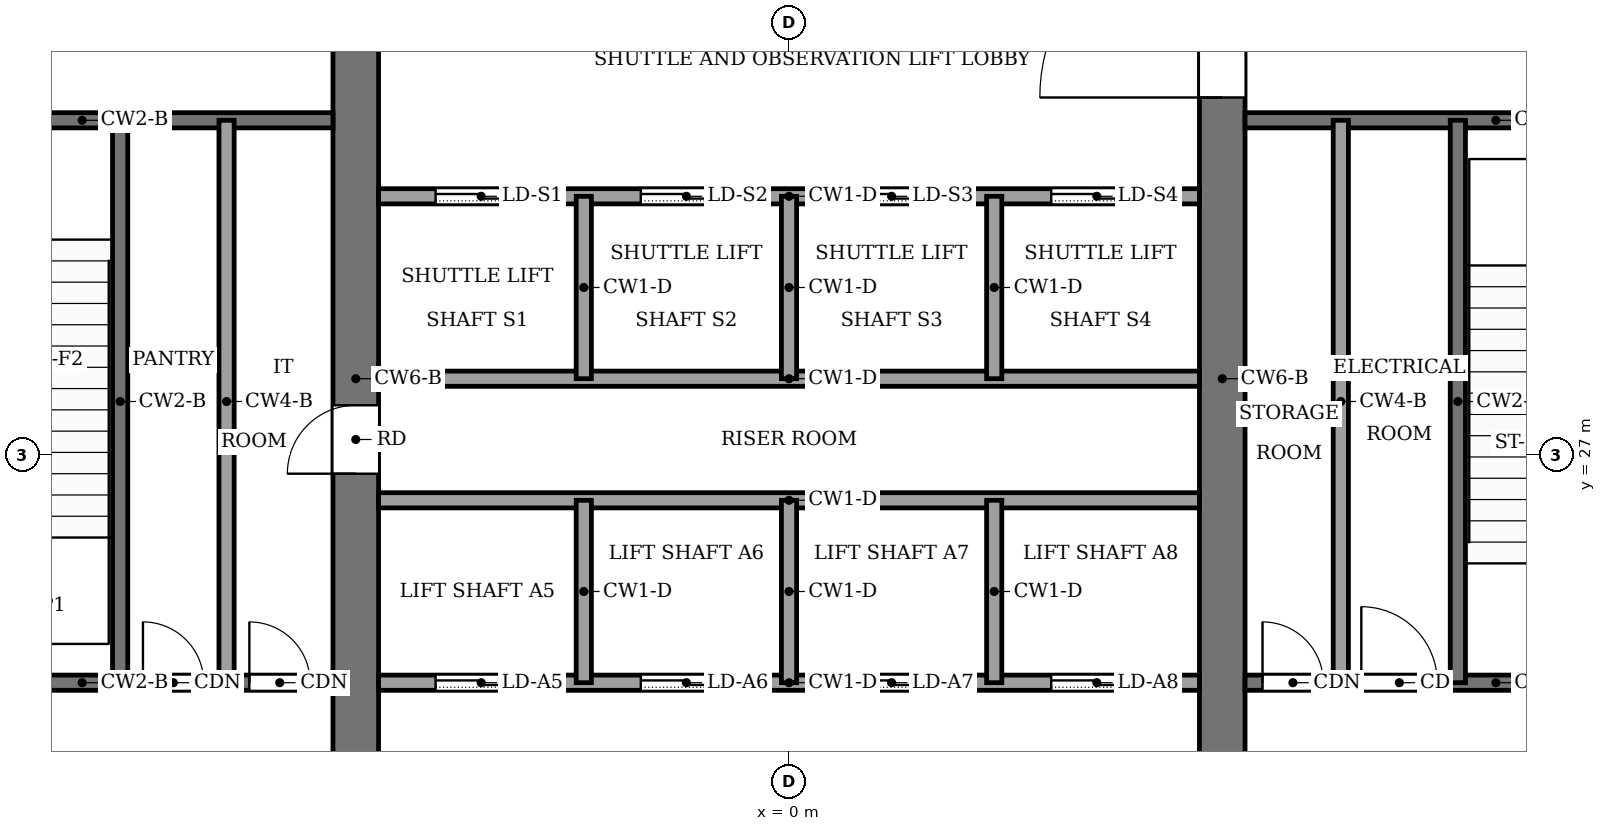
"""IFC4 building model, lengths in metres.
Left out: names, types, materials, properties, quantities, classifications, styles, units other than length and angle.
Written with IfcOpenShell. Run it as: python <this file> out.ifc"""

import sys

from ifc_helpers import new_model, si_unit, direction, frame, frame_2d, origin, place, context, subcontext, project, spatial, rectangle, extrude, element, fill, save


model = new_model("IFC4")
c1 = context("Model", 3, precision=1e-05, world=origin(), true_north=direction((0.0, 1.0)))
c2 = subcontext(c1, "Body", "Model", "MODEL_VIEW")
j1 = project(units=[si_unit("LENGTHUNIT", "METRE"), si_unit("PLANEANGLEUNIT", "RADIAN")], contexts=[c1])
p1 = place(None, origin())
s1 = spatial("IfcSite", under=j1, at=p1, CompositionType="ELEMENT")
p2 = place(p1, origin())
s2 = spatial("IfcBuilding", under=s1, at=p2, CompositionType="ELEMENT")
p3 = place(p2, frame((0.0, 0.0, 177.0)))
s3 = spatial("IfcBuildingStorey", under=s2, at=p3, CompositionType="ELEMENT", Elevation=177.0)
p4 = place(p3, frame((-5.7, 18.4, -0.13), z_axis=(0.0, 0.0, 1.0), x_axis=(0.0, 1.0, 0.0)))
e1 = element("IfcWall", 1, at=p4, inside=s3, PredefinedType="SHEAR", context=c2, shape_type="SweptSolid", body=[
    extrude(rectangle(XDim=19.2, YDim=0.6, at=frame_2d((9.6, 0.0))), origin(), (0.0, 0.0, 1.0), 5.0),
])
p5 = place(p4, frame((8.35, 0.0, 0.13)))
e2 = element("IfcOpeningElement", 2, at=p5, cuts=e1, PredefinedType="OPENING", context=c2, shape_type="SweptSolid", body=[
    extrude(rectangle(XDim=0.9, YDim=2.1, at=frame_2d((0.45, 1.05))), frame((0.0, 0.31, 0.0), z_axis=(0.0, -1.0, 0.0), x_axis=(1.0, 0.0, 0.0)), (0.0, 0.0, 1.0), 0.62),
])
p6 = place(p3, frame((5.7, 18.4, -0.13), z_axis=(0.0, 0.0, 1.0), x_axis=(0.0, 1.0, 0.0)))
e3 = element("IfcWall", 3, at=p6, inside=s3, PredefinedType="SHEAR", context=c2, shape_type="SweptSolid", body=[
    extrude(rectangle(XDim=19.2, YDim=0.6, at=frame_2d((9.6, 0.0))), origin(), (0.0, 0.0, 1.0), 5.0),
])
p7 = place(p6, frame((13.3, 0.0, 0.13)))
e4 = element("IfcOpeningElement", 4, at=p7, cuts=e3, PredefinedType="OPENING", context=c2, shape_type="SweptSolid", body=[
    extrude(rectangle(XDim=2.4, YDim=2.4, at=frame_2d((1.2, 1.2))), frame((0.0, 0.31, 0.0), z_axis=(0.0, -1.0, 0.0), x_axis=(1.0, 0.0, 0.0)), (0.0, 0.0, 1.0), 0.62),
])
p8 = place(p3, frame((-12.6, 24.0, 0.0), z_axis=(0.0, 0.0, 1.0), x_axis=(1.0, 0.0, 0.0)))
e5 = element("IfcWall", 5, at=p8, inside=s3, PredefinedType="PARTITIONING", context=c2, shape_type="SweptSolid", body=[
    extrude(rectangle(XDim=6.6, YDim=0.2, at=frame_2d((3.3, 0.0))), origin(), (0.0, 0.0, 1.0), 4.87),
])
p9 = place(p8, frame((4.1, 0.0, 0.0)))
e6 = element("IfcOpeningElement", 6, at=p9, cuts=e5, PredefinedType="OPENING", context=c2, shape_type="SweptSolid", body=[
    extrude(rectangle(XDim=0.8, YDim=2.1, at=frame_2d((0.4, 1.05))), frame((0.0, 0.11, 0.0), z_axis=(0.0, -1.0, 0.0), x_axis=(1.0, 0.0, 0.0)), (0.0, 0.0, 1.0), 0.22),
])
p10 = place(p8, frame((5.5, 0.0, 0.0)))
e7 = element("IfcOpeningElement", 7, at=p10, cuts=e5, PredefinedType="OPENING", context=c2, shape_type="SweptSolid", body=[
    extrude(rectangle(XDim=0.8, YDim=2.1, at=frame_2d((0.4, 1.05))), frame((0.0, 0.11, 0.0), z_axis=(0.0, -1.0, 0.0), x_axis=(1.0, 0.0, 0.0)), (0.0, 0.0, 1.0), 0.22),
])
p11 = place(p3, frame((-5.4, 24.0, 0.0), z_axis=(0.0, 0.0, 1.0), x_axis=(1.0, 0.0, 0.0)))
e8 = element("IfcWall", 8, at=p11, inside=s3, PredefinedType="PARTITIONING", context=c2, shape_type="SweptSolid", body=[
    extrude(rectangle(XDim=10.8, YDim=0.2, at=frame_2d((5.4, 0.0))), origin(), (0.0, 0.0, 1.0), 4.87),
])
p12 = place(p11, frame((0.75, 0.0, 0.0)))
e9 = element("IfcOpeningElement", 9, at=p12, cuts=e8, PredefinedType="OPENING", context=c2, shape_type="SweptSolid", body=[
    extrude(rectangle(XDim=1.2, YDim=2.2, at=frame_2d((0.6, 1.1))), frame((0.0, 0.11, 0.0), z_axis=(0.0, -1.0, 0.0), x_axis=(1.0, 0.0, 0.0)), (0.0, 0.0, 1.0), 0.22),
])
p13 = place(p11, frame((3.45, 0.0, 0.0)))
e10 = element("IfcOpeningElement", 10, at=p13, cuts=e8, PredefinedType="OPENING", context=c2, shape_type="SweptSolid", body=[
    extrude(rectangle(XDim=1.2, YDim=2.2, at=frame_2d((0.6, 1.1))), frame((0.0, 0.11, 0.0), z_axis=(0.0, -1.0, 0.0), x_axis=(1.0, 0.0, 0.0)), (0.0, 0.0, 1.0), 0.22),
])
p14 = place(p11, frame((6.15, 0.0, 0.0)))
e11 = element("IfcOpeningElement", 11, at=p14, cuts=e8, PredefinedType="OPENING", context=c2, shape_type="SweptSolid", body=[
    extrude(rectangle(XDim=1.2, YDim=2.2, at=frame_2d((0.6, 1.1))), frame((0.0, 0.11, 0.0), z_axis=(0.0, -1.0, 0.0), x_axis=(1.0, 0.0, 0.0)), (0.0, 0.0, 1.0), 0.22),
])
p15 = place(p11, frame((8.85, 0.0, 0.0)))
e12 = element("IfcOpeningElement", 12, at=p15, cuts=e8, PredefinedType="OPENING", context=c2, shape_type="SweptSolid", body=[
    extrude(rectangle(XDim=1.2, YDim=2.2, at=frame_2d((0.6, 1.1))), frame((0.0, 0.11, 0.0), z_axis=(0.0, -1.0, 0.0), x_axis=(1.0, 0.0, 0.0)), (0.0, 0.0, 1.0), 0.22),
])
p16 = place(p3, frame((6.0, 24.0, 0.0), z_axis=(0.0, 0.0, 1.0), x_axis=(1.0, 0.0, 0.0)))
e13 = element("IfcWall", 13, at=p16, inside=s3, PredefinedType="PARTITIONING", context=c2, shape_type="SweptSolid", body=[
    extrude(rectangle(XDim=6.6, YDim=0.2, at=frame_2d((3.3, 0.0))), origin(), (0.0, 0.0, 1.0), 4.87),
])
p17 = place(p16, frame((0.23, 0.0, 0.0)))
e14 = element("IfcOpeningElement", 14, at=p17, cuts=e13, PredefinedType="OPENING", context=c2, shape_type="SweptSolid", body=[
    extrude(rectangle(XDim=0.8, YDim=2.1, at=frame_2d((0.4, 1.05))), frame((0.0, 0.11, 0.0), z_axis=(0.0, -1.0, 0.0), x_axis=(1.0, 0.0, 0.0)), (0.0, 0.0, 1.0), 0.22),
])
p18 = place(p16, frame((1.53, 0.0, 0.0)))
e15 = element("IfcOpeningElement", 15, at=p18, cuts=e13, PredefinedType="OPENING", context=c2, shape_type="SweptSolid", body=[
    extrude(rectangle(XDim=1.0, YDim=2.1, at=frame_2d((0.5, 1.05))), frame((0.0, 0.11, 0.0), z_axis=(0.0, -1.0, 0.0), x_axis=(1.0, 0.0, 0.0)), (0.0, 0.0, 1.0), 0.22),
])
p19 = place(p16, frame((4.4, 0.0, 0.0)))
e16 = element("IfcOpeningElement", 16, at=p19, cuts=e13, PredefinedType="OPENING", context=c2, shape_type="SweptSolid", body=[
    extrude(rectangle(XDim=1.2, YDim=2.2, at=frame_2d((0.6, 1.1))), frame((0.0, 0.11, 0.0), z_axis=(0.0, -1.0, 0.0), x_axis=(1.0, 0.0, 0.0)), (0.0, 0.0, 1.0), 0.22),
])
for number, where, z_axis, x_axis in (
    (17, (-5.4, 26.4, 0.0), (0.0, 0.0, 1.0), (1.0, 0.0, 0.0)),
    (18, (-5.4, 28.0, 0.0), (0.0, 0.0, 1.0), (1.0, 0.0, 0.0)),
):
    element("IfcWall", number, at=place(p3, frame(where, z_axis=z_axis, x_axis=x_axis)), inside=s3, PredefinedType="PARTITIONING", context=c2, shape_type="SweptSolid", body=[
        extrude(rectangle(XDim=10.8, YDim=0.2, at=frame_2d((5.4, 0.0))), origin(), (0.0, 0.0, 1.0), 4.87),
    ])
p20 = place(p3, frame((-5.4, 30.4, 0.0), z_axis=(0.0, 0.0, 1.0), x_axis=(1.0, 0.0, 0.0)))
e19 = element("IfcWall", 19, at=p20, inside=s3, PredefinedType="PARTITIONING", context=c2, shape_type="SweptSolid", body=[
    extrude(rectangle(XDim=10.8, YDim=0.2, at=frame_2d((5.4, 0.0))), origin(), (0.0, 0.0, 1.0), 4.87),
])
p21 = place(p20, frame((0.75, 0.0, 0.0)))
e20 = element("IfcOpeningElement", 20, at=p21, cuts=e19, PredefinedType="OPENING", context=c2, shape_type="SweptSolid", body=[
    extrude(rectangle(XDim=1.2, YDim=2.2, at=frame_2d((0.6, 1.1))), frame((0.0, 0.11, 0.0), z_axis=(0.0, -1.0, 0.0), x_axis=(1.0, 0.0, 0.0)), (0.0, 0.0, 1.0), 0.22),
])
p22 = place(p20, frame((3.45, 0.0, 0.0)))
e21 = element("IfcOpeningElement", 21, at=p22, cuts=e19, PredefinedType="OPENING", context=c2, shape_type="SweptSolid", body=[
    extrude(rectangle(XDim=1.2, YDim=2.2, at=frame_2d((0.6, 1.1))), frame((0.0, 0.11, 0.0), z_axis=(0.0, -1.0, 0.0), x_axis=(1.0, 0.0, 0.0)), (0.0, 0.0, 1.0), 0.22),
])
p23 = place(p20, frame((6.15, 0.0, 0.0)))
e22 = element("IfcOpeningElement", 22, at=p23, cuts=e19, PredefinedType="OPENING", context=c2, shape_type="SweptSolid", body=[
    extrude(rectangle(XDim=1.2, YDim=2.2, at=frame_2d((0.6, 1.1))), frame((0.0, 0.11, 0.0), z_axis=(0.0, -1.0, 0.0), x_axis=(1.0, 0.0, 0.0)), (0.0, 0.0, 1.0), 0.22),
])
p24 = place(p20, frame((8.85, 0.0, 0.0)))
e23 = element("IfcOpeningElement", 23, at=p24, cuts=e19, PredefinedType="OPENING", context=c2, shape_type="SweptSolid", body=[
    extrude(rectangle(XDim=1.2, YDim=2.2, at=frame_2d((0.6, 1.1))), frame((0.0, 0.11, 0.0), z_axis=(0.0, -1.0, 0.0), x_axis=(1.0, 0.0, 0.0)), (0.0, 0.0, 1.0), 0.22),
])
p25 = place(p3, frame((-12.6, 31.4, 0.0), z_axis=(0.0, 0.0, 1.0), x_axis=(1.0, 0.0, 0.0)))
e24 = element("IfcWall", 24, at=p25, inside=s3, PredefinedType="PARTITIONING", context=c2, shape_type="SweptSolid", body=[
    extrude(rectangle(XDim=6.6, YDim=0.2, at=frame_2d((3.3, 0.0))), origin(), (0.0, 0.0, 1.0), 4.87),
])
p26 = place(p25, frame((1.0, 0.0, 0.0)))
e25 = element("IfcOpeningElement", 25, at=p26, cuts=e24, PredefinedType="OPENING", context=c2, shape_type="SweptSolid", body=[
    extrude(rectangle(XDim=1.2, YDim=2.2, at=frame_2d((0.6, 1.1))), frame((0.0, 0.11, 0.0), z_axis=(0.0, -1.0, 0.0), x_axis=(1.0, 0.0, 0.0)), (0.0, 0.0, 1.0), 0.22),
])
p27 = place(p3, frame((6.0, 31.4, 0.0), z_axis=(0.0, 0.0, 1.0), x_axis=(1.0, 0.0, 0.0)))
e26 = element("IfcWall", 26, at=p27, inside=s3, PredefinedType="PARTITIONING", context=c2, shape_type="SweptSolid", body=[
    extrude(rectangle(XDim=6.6, YDim=0.2, at=frame_2d((3.3, 0.0))), origin(), (0.0, 0.0, 1.0), 4.87),
])
for number, where, z_axis, x_axis in (
    (27, (-8.8, 24.0, 0.0), (0.0, 0.0, 1.0), (0.0, 1.0, 0.0)),
    (28, (-7.4, 24.0, 0.0), (0.0, 0.0, 1.0), (0.0, 1.0, 0.0)),
):
    element("IfcWall", number, at=place(p3, frame(where, z_axis=z_axis, x_axis=x_axis)), inside=s3, PredefinedType="PARTITIONING", context=c2, shape_type="SweptSolid", body=[
        extrude(rectangle(XDim=7.4, YDim=0.2, at=frame_2d((3.7, 0.0))), origin(), (0.0, 0.0, 1.0), 4.87),
    ])
for number, where, z_axis, x_axis in (
    (29, (-2.7, 24.0, 0.0), (0.0, 0.0, 1.0), (0.0, 1.0, 0.0)),
    (30, (-2.7, 28.0, 0.0), (0.0, 0.0, 1.0), (0.0, 1.0, 0.0)),
    (31, (0.0, 24.0, 0.0), (0.0, 0.0, 1.0), (0.0, 1.0, 0.0)),
    (32, (0.0, 28.0, 0.0), (0.0, 0.0, 1.0), (0.0, 1.0, 0.0)),
    (33, (2.7, 24.0, 0.0), (0.0, 0.0, 1.0), (0.0, 1.0, 0.0)),
    (34, (2.7, 28.0, 0.0), (0.0, 0.0, 1.0), (0.0, 1.0, 0.0)),
):
    element("IfcWall", number, at=place(p3, frame(where, z_axis=z_axis, x_axis=x_axis)), inside=s3, PredefinedType="PARTITIONING", context=c2, shape_type="SweptSolid", body=[
        extrude(rectangle(XDim=2.4, YDim=0.2, at=frame_2d((1.2, 0.0))), origin(), (0.0, 0.0, 1.0), 4.87),
    ])
for number, where, z_axis, x_axis in (
    (35, (7.26, 24.0, 0.0), (0.0, 0.0, 1.0), (0.0, 1.0, 0.0)),
    (36, (8.8, 24.0, 0.0), (0.0, 0.0, 1.0), (0.0, 1.0, 0.0)),
):
    element("IfcWall", number, at=place(p3, frame(where, z_axis=z_axis, x_axis=x_axis)), inside=s3, PredefinedType="PARTITIONING", context=c2, shape_type="SweptSolid", body=[
        extrude(rectangle(XDim=7.4, YDim=0.2, at=frame_2d((3.7, 0.0))), origin(), (0.0, 0.0, 1.0), 4.87),
    ])
p28 = place(p12, origin())
e37 = element("IfcDoor", 37, at=p28, inside=s3, OperationType="SLIDING_TO_LEFT", PredefinedType="DOOR", context=c2, shape_type="SweptSolid", body=[
    extrude(rectangle(XDim=1.2, YDim=2.2, at=frame_2d((0.6, 1.1))), frame((0.0, 0.025, 0.0), z_axis=(0.0, -1.0, 0.0), x_axis=(1.0, 0.0, 0.0)), (0.0, 0.0, 1.0), 0.05),
])
fill(e9, e37)
p29 = place(p13, origin())
e38 = element("IfcDoor", 38, at=p29, inside=s3, OperationType="SLIDING_TO_LEFT", PredefinedType="DOOR", context=c2, shape_type="SweptSolid", body=[
    extrude(rectangle(XDim=1.2, YDim=2.2, at=frame_2d((0.6, 1.1))), frame((0.0, 0.025, 0.0), z_axis=(0.0, -1.0, 0.0), x_axis=(1.0, 0.0, 0.0)), (0.0, 0.0, 1.0), 0.05),
])
fill(e10, e38)
p30 = place(p14, origin())
e39 = element("IfcDoor", 39, at=p30, inside=s3, OperationType="SLIDING_TO_LEFT", PredefinedType="DOOR", context=c2, shape_type="SweptSolid", body=[
    extrude(rectangle(XDim=1.2, YDim=2.2, at=frame_2d((0.6, 1.1))), frame((0.0, 0.025, 0.0), z_axis=(0.0, -1.0, 0.0), x_axis=(1.0, 0.0, 0.0)), (0.0, 0.0, 1.0), 0.05),
])
fill(e11, e39)
p31 = place(p15, origin())
e40 = element("IfcDoor", 40, at=p31, inside=s3, OperationType="SLIDING_TO_LEFT", PredefinedType="DOOR", context=c2, shape_type="SweptSolid", body=[
    extrude(rectangle(XDim=1.2, YDim=2.2, at=frame_2d((0.6, 1.1))), frame((0.0, 0.025, 0.0), z_axis=(0.0, -1.0, 0.0), x_axis=(1.0, 0.0, 0.0)), (0.0, 0.0, 1.0), 0.05),
])
fill(e12, e40)
p32 = place(p21, origin())
e41 = element("IfcDoor", 41, at=p32, inside=s3, OperationType="SLIDING_TO_LEFT", PredefinedType="DOOR", context=c2, shape_type="SweptSolid", body=[
    extrude(rectangle(XDim=1.2, YDim=2.2, at=frame_2d((0.6, 1.1))), frame((0.0, 0.025, 0.0), z_axis=(0.0, -1.0, 0.0), x_axis=(1.0, 0.0, 0.0)), (0.0, 0.0, 1.0), 0.05),
])
fill(e20, e41)
p33 = place(p22, origin())
e42 = element("IfcDoor", 42, at=p33, inside=s3, OperationType="SLIDING_TO_LEFT", PredefinedType="DOOR", context=c2, shape_type="SweptSolid", body=[
    extrude(rectangle(XDim=1.2, YDim=2.2, at=frame_2d((0.6, 1.1))), frame((0.0, 0.025, 0.0), z_axis=(0.0, -1.0, 0.0), x_axis=(1.0, 0.0, 0.0)), (0.0, 0.0, 1.0), 0.05),
])
fill(e21, e42)
p34 = place(p23, origin())
e43 = element("IfcDoor", 43, at=p34, inside=s3, OperationType="SLIDING_TO_LEFT", PredefinedType="DOOR", context=c2, shape_type="SweptSolid", body=[
    extrude(rectangle(XDim=1.2, YDim=2.2, at=frame_2d((0.6, 1.1))), frame((0.0, 0.025, 0.0), z_axis=(0.0, -1.0, 0.0), x_axis=(1.0, 0.0, 0.0)), (0.0, 0.0, 1.0), 0.05),
])
fill(e22, e43)
p35 = place(p24, origin())
e44 = element("IfcDoor", 44, at=p35, inside=s3, OperationType="SLIDING_TO_LEFT", PredefinedType="DOOR", context=c2, shape_type="SweptSolid", body=[
    extrude(rectangle(XDim=1.2, YDim=2.2, at=frame_2d((0.6, 1.1))), frame((0.0, 0.025, 0.0), z_axis=(0.0, -1.0, 0.0), x_axis=(1.0, 0.0, 0.0)), (0.0, 0.0, 1.0), 0.05),
])
fill(e23, e44)
p36 = place(p9, origin())
e45 = element("IfcDoor", 45, at=p36, inside=s3, OperationType="SINGLE_SWING_LEFT", PredefinedType="DOOR", context=c2, shape_type="SweptSolid", body=[
    extrude(rectangle(XDim=0.8, YDim=2.1, at=frame_2d((0.4, 1.05))), frame((0.0, 0.025, 0.0), z_axis=(0.0, -1.0, 0.0), x_axis=(1.0, 0.0, 0.0)), (0.0, 0.0, 1.0), 0.05),
])
fill(e6, e45)
p37 = place(p10, origin())
e46 = element("IfcDoor", 46, at=p37, inside=s3, OperationType="SINGLE_SWING_RIGHT", PredefinedType="DOOR", context=c2, shape_type="SweptSolid", body=[
    extrude(rectangle(XDim=0.8, YDim=2.1, at=frame_2d((0.4, 1.05))), frame((0.0, 0.025, 0.0), z_axis=(0.0, -1.0, 0.0), x_axis=(1.0, 0.0, 0.0)), (0.0, 0.0, 1.0), 0.05),
])
fill(e7, e46)
p38 = place(p17, origin())
e47 = element("IfcDoor", 47, at=p38, inside=s3, OperationType="SINGLE_SWING_RIGHT", PredefinedType="DOOR", context=c2, shape_type="SweptSolid", body=[
    extrude(rectangle(XDim=0.8, YDim=2.1, at=frame_2d((0.4, 1.05))), frame((0.0, 0.025, 0.0), z_axis=(0.0, -1.0, 0.0), x_axis=(1.0, 0.0, 0.0)), (0.0, 0.0, 1.0), 0.05),
])
fill(e14, e47)
p39 = place(p18, origin())
e48 = element("IfcDoor", 48, at=p39, inside=s3, OperationType="SINGLE_SWING_LEFT", PredefinedType="DOOR", context=c2, shape_type="SweptSolid", body=[
    extrude(rectangle(XDim=1.0, YDim=2.1, at=frame_2d((0.5, 1.05))), frame((0.0, 0.025, 0.0), z_axis=(0.0, -1.0, 0.0), x_axis=(1.0, 0.0, 0.0)), (0.0, 0.0, 1.0), 0.05),
])
fill(e15, e48)
p40 = place(p5, origin())
e49 = element("IfcDoor", 49, at=p40, inside=s3, OperationType="SINGLE_SWING_RIGHT", PredefinedType="DOOR", context=c2, shape_type="SweptSolid", body=[
    extrude(rectangle(XDim=0.9, YDim=2.1, at=frame_2d((0.45, 1.05))), frame((0.0, 0.025, 0.0), z_axis=(0.0, -1.0, 0.0), x_axis=(1.0, 0.0, 0.0)), (0.0, 0.0, 1.0), 0.05),
])
fill(e2, e49)
p41 = place(p7, origin())
e50 = element("IfcDoor", 50, at=p41, inside=s3, OperationType="DOUBLE_DOOR_SINGLE_SWING", PredefinedType="DOOR", context=c2, shape_type="SweptSolid", body=[
    extrude(rectangle(XDim=2.4, YDim=2.4, at=frame_2d((1.2, 1.2))), frame((0.0, 0.025, 0.0), z_axis=(0.0, -1.0, 0.0), x_axis=(1.0, 0.0, 0.0)), (0.0, 0.0, 1.0), 0.05),
])
fill(e4, e50)
save(model, sys.argv[1])
